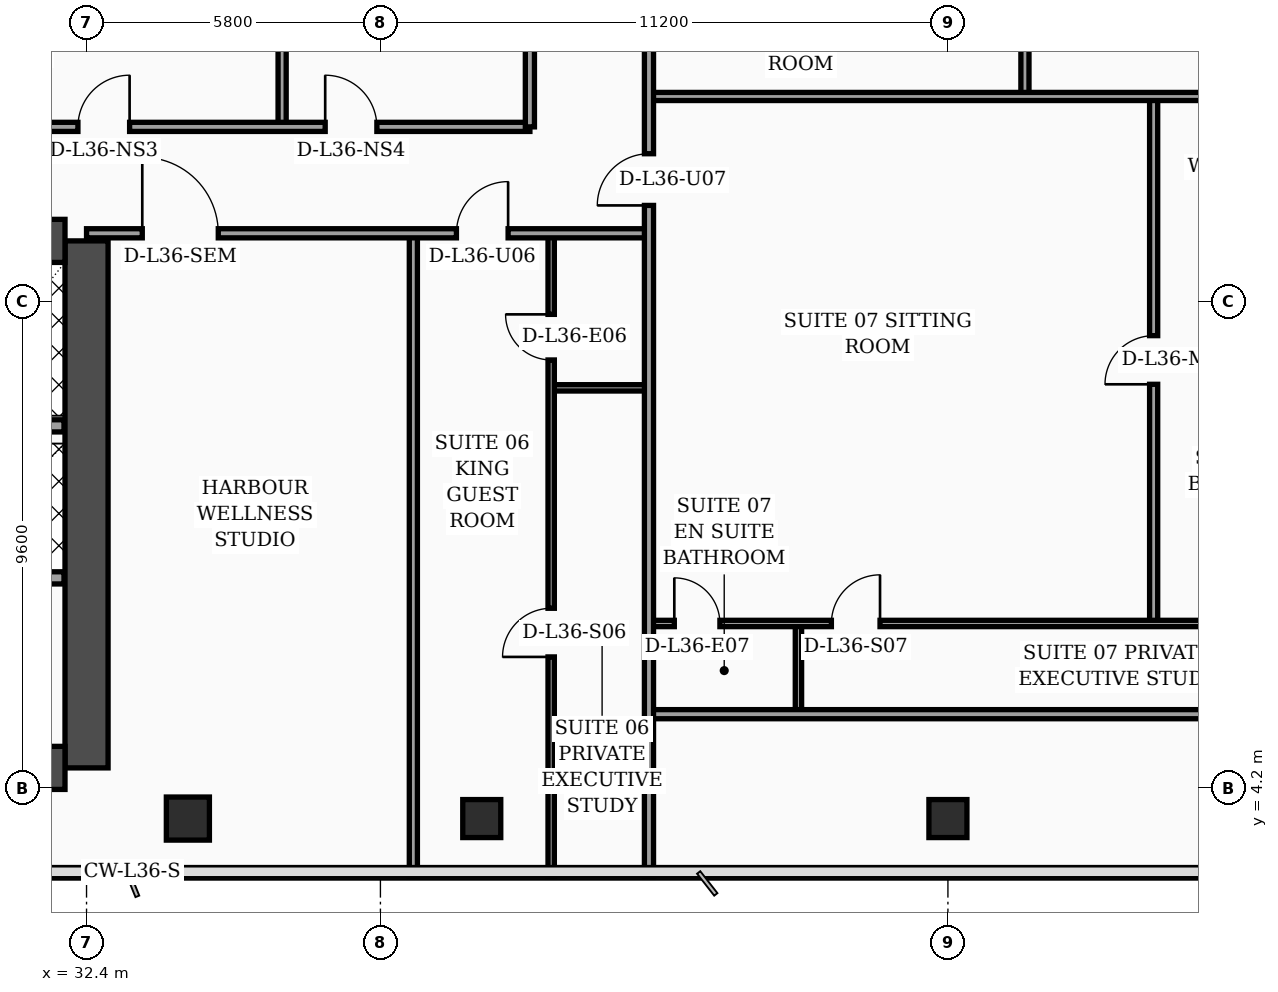
"""IFC4 building model, lengths in metres.
Left out: names, types, materials, properties, quantities, classifications, styles, units other than length and angle.
Written with IfcOpenShell. Run it as: python <this file> out.ifc"""

import sys

from ifc_helpers import new_model, si_unit, direction, frame, frame_2d, origin, origin_2d, place, context, subcontext, project, spatial, rectangle, hollow_rectangle, extrude, element, fill, save


model = new_model("IFC4")
c1 = context("Model", 3, precision=1e-05, world=origin(), true_north=direction((0.0, 1.0)))
c2 = subcontext(c1, "Body", "Model", "MODEL_VIEW")
j1 = project(units=[si_unit("LENGTHUNIT", "METRE"), si_unit("PLANEANGLEUNIT", "RADIAN")], contexts=[c1])
p1 = place(None, origin())
s1 = spatial("IfcSite", under=j1, at=p1, CompositionType="ELEMENT")
p2 = place(p1, origin())
s2 = spatial("IfcBuilding", under=s1, at=p2, CompositionType="ELEMENT")
p3 = place(p2, frame((0.0, 0.0, 148.5)))
s3 = spatial("IfcBuildingStorey", under=s2, at=p3, CompositionType="ELEMENT", Elevation=148.5)
p4 = place(p3, frame((32.4, 4.6, 0.0), z_axis=(0.0, 0.0, 1.0), x_axis=(0.0, 1.0, 0.0)))
e1 = element("IfcWall", 1, at=p4, inside=s3, PredefinedType="SHEAR", context=c2, shape_type="SweptSolid", body=[
    extrude(rectangle(XDim=10.4, YDim=0.85, at=frame_2d((5.2, 0.0))), origin(), (0.0, 0.0, 1.0), 3.56),
])
p5 = place(p3, frame((22.025, 15.0, 0.0), z_axis=(0.0, 0.0, 1.0), x_axis=(1.0, 0.0, 0.0)))
e2 = element("IfcWall", 2, at=p5, inside=s3, PredefinedType="SHEAR", context=c2, shape_type="SweptSolid", body=[
    extrude(rectangle(XDim=9.95, YDim=0.85, at=frame_2d((4.975, 0.0))), origin(), (0.0, 0.0, 1.0), 3.56),
])
p6 = place(p5, frame((4.88, 0.0, 0.0)))
e3 = element("IfcOpeningElement", 3, at=p6, cuts=e2, PredefinedType="OPENING", context=c2, shape_type="SweptSolid", body=[
    extrude(rectangle(XDim=1.1, YDim=2.2, at=frame_2d((0.55, 1.1))), frame((0.0, 0.435, 0.0), z_axis=(0.0, -1.0, 0.0), x_axis=(1.0, 0.0, 0.0)), (0.0, 0.0, 1.0), 0.87),
])
p7 = place(p3, frame((22.025, 4.6, 0.0), z_axis=(0.0, 0.0, 1.0), x_axis=(1.0, 0.0, 0.0)))
e4 = element("IfcWall", 4, at=p7, inside=s3, PredefinedType="SHEAR", context=c2, shape_type="SweptSolid", body=[
    extrude(rectangle(XDim=9.95, YDim=0.85, at=frame_2d((4.975, 0.0))), origin(), (0.0, 0.0, 1.0), 3.56),
])
p8 = place(p3, frame((34.4, 3.6, 0.0), z_axis=(0.0, 0.0, 1.0), x_axis=(1.0, 0.0, 0.0)))
e5 = element("IfcColumn", 5, at=p8, inside=s3, PredefinedType="COLUMN", context=c2, shape_type="SweptSolid", body=[
    extrude(hollow_rectangle(XDim=0.85, YDim=0.85, WallThickness=0.036, at=origin_2d()), origin(), (0.0, 0.0, 1.0), 3.56),
])
for number, where, z_axis, x_axis in (
    (6, (40.2, 3.6, 0.0), (0.0, 0.0, 1.0), (1.0, 0.0, 0.0)),
    (7, (49.4, 3.6, 0.0), (0.0, 0.0, 1.0), (1.0, 0.0, 0.0)),
):
    element("IfcColumn", number, at=place(p3, frame(where, z_axis=z_axis, x_axis=x_axis)), inside=s3, PredefinedType="COLUMN", context=c2, shape_type="SweptSolid", body=[
        extrude(hollow_rectangle(XDim=0.75, YDim=0.75, WallThickness=0.032, at=origin_2d()), origin(), (0.0, 0.0, 1.0), 3.56),
    ])
p9 = place(p3, frame((59.23, 5.505, 0.0), z_axis=(0.0, 0.0, 1.0), x_axis=(-0.300509063924, 0.953778958931, 0.0)))
e8 = element("IfcWall", 8, at=p9, inside=s3, PredefinedType="SOLIDWALL", context=c2, shape_type="SweptSolid", body=[
    extrude(rectangle(XDim=30.814, YDim=0.32, at=frame_2d((15.407, 0.0))), origin(), (0.0, 0.0, 1.0), 3.56),
])
p10 = place(p9, frame((4.747, 0.0, 0.0)))
e9 = element("IfcOpeningElement", 9, at=p10, cuts=e8, PredefinedType="OPENING", context=c2, shape_type="SweptSolid", body=[
    extrude(rectangle(XDim=1.4, YDim=2.25, at=frame_2d((0.7, 1.125))), frame((0.0, 0.17, 0.0), z_axis=(0.0, -1.0, 0.0), x_axis=(1.0, 0.0, 0.0)), (0.0, 0.0, 1.0), 0.34),
])
p11 = place(p9, frame((2.65, 0.0, 0.75)))
e10 = element("IfcOpeningElement", 10, at=p11, cuts=e8, PredefinedType="OPENING", context=c2, shape_type="SweptSolid", body=[
    extrude(rectangle(XDim=1.5, YDim=1.6, at=frame_2d((0.75, 0.8))), frame((0.0, 0.17, 0.0), z_axis=(0.0, -1.0, 0.0), x_axis=(1.0, 0.0, 0.0)), (0.0, 0.0, 1.0), 0.34),
])
p12 = place(p9, frame((7.8, 0.0, 0.75)))
e11 = element("IfcOpeningElement", 11, at=p12, cuts=e8, PredefinedType="OPENING", context=c2, shape_type="SweptSolid", body=[
    extrude(rectangle(XDim=1.5, YDim=1.6, at=frame_2d((0.75, 0.8))), frame((0.0, 0.17, 0.0), z_axis=(0.0, -1.0, 0.0), x_axis=(1.0, 0.0, 0.0)), (0.0, 0.0, 1.0), 0.34),
])
p13 = place(p9, frame((10.9, 0.0, 0.75)))
e12 = element("IfcOpeningElement", 12, at=p13, cuts=e8, PredefinedType="OPENING", context=c2, shape_type="SweptSolid", body=[
    extrude(rectangle(XDim=1.5, YDim=1.6, at=frame_2d((0.75, 0.8))), frame((0.0, 0.17, 0.0), z_axis=(0.0, -1.0, 0.0), x_axis=(1.0, 0.0, 0.0)), (0.0, 0.0, 1.0), 0.34),
])
p14 = place(p9, frame((14.0, 0.0, 0.75)))
e13 = element("IfcOpeningElement", 13, at=p14, cuts=e8, PredefinedType="OPENING", context=c2, shape_type="SweptSolid", body=[
    extrude(rectangle(XDim=1.5, YDim=1.6, at=frame_2d((0.75, 0.8))), frame((0.0, 0.17, 0.0), z_axis=(0.0, -1.0, 0.0), x_axis=(1.0, 0.0, 0.0)), (0.0, 0.0, 1.0), 0.34),
])
p15 = place(p9, frame((17.1, 0.0, 0.75)))
e14 = element("IfcOpeningElement", 14, at=p15, cuts=e8, PredefinedType="OPENING", context=c2, shape_type="SweptSolid", body=[
    extrude(rectangle(XDim=1.5, YDim=1.6, at=frame_2d((0.75, 0.8))), frame((0.0, 0.17, 0.0), z_axis=(0.0, -1.0, 0.0), x_axis=(1.0, 0.0, 0.0)), (0.0, 0.0, 1.0), 0.34),
])
p16 = place(p9, frame((23.3, 0.0, 0.75)))
e15 = element("IfcOpeningElement", 15, at=p16, cuts=e8, PredefinedType="OPENING", context=c2, shape_type="SweptSolid", body=[
    extrude(rectangle(XDim=1.5, YDim=1.6, at=frame_2d((0.75, 0.8))), frame((0.0, 0.17, 0.0), z_axis=(0.0, -1.0, 0.0), x_axis=(1.0, 0.0, 0.0)), (0.0, 0.0, 1.0), 0.34),
])
p17 = place(p9, frame((27.45, 0.0, 0.75)))
e16 = element("IfcOpeningElement", 16, at=p17, cuts=e8, PredefinedType="OPENING", context=c2, shape_type="SweptSolid", body=[
    extrude(rectangle(XDim=1.5, YDim=1.6, at=frame_2d((0.75, 0.8))), frame((0.0, 0.17, 0.0), z_axis=(0.0, -1.0, 0.0), x_axis=(1.0, 0.0, 0.0)), (0.0, 0.0, 1.0), 0.34),
])
p18 = place(p3, frame((27.02, 11.35, 0.0), z_axis=(0.0, 0.0, 1.0), x_axis=(1.0, 0.0, 0.0)))
e17 = element("IfcWall", 17, at=p18, inside=s3, PredefinedType="SOLIDWALL", context=c2, shape_type="SweptSolid", body=[
    extrude(rectangle(XDim=4.935, YDim=0.24, at=frame_2d((2.468, 0.0))), origin(), (0.0, 0.0, 1.0), 3.56),
])
p19 = place(p18, frame((0.45, 0.0, 0.0)))
e18 = element("IfcOpeningElement", 18, at=p19, cuts=e17, PredefinedType="OPENING", context=c2, shape_type="SweptSolid", body=[
    extrude(rectangle(XDim=1.3, YDim=2.35, at=frame_2d((0.65, 1.175))), frame((0.0, 0.13, 0.0), z_axis=(0.0, -1.0, 0.0), x_axis=(1.0, 0.0, 0.0)), (0.0, 0.0, 1.0), 0.26),
])
p20 = place(p3, frame((27.02, 8.35, 0.0), z_axis=(0.0, 0.0, 1.0), x_axis=(1.0, 0.0, 0.0)))
e19 = element("IfcWall", 19, at=p20, inside=s3, PredefinedType="SOLIDWALL", context=c2, shape_type="SweptSolid", body=[
    extrude(rectangle(XDim=4.935, YDim=0.24, at=frame_2d((2.468, 0.0))), origin(), (0.0, 0.0, 1.0), 3.56),
])
p21 = place(p3, frame((41.57, 12.1, 0.0), z_axis=(0.0, 0.0, 1.0), x_axis=(1.0, 0.0, 0.0)))
e20 = element("IfcWall", 20, at=p21, inside=s3, PredefinedType="PARTITIONING", context=c2, shape_type="SweptSolid", body=[
    extrude(rectangle(XDim=1.93, YDim=0.125, at=frame_2d((0.965, 0.0))), origin(), (0.0, 0.0, 1.0), 3.56),
])
p22 = place(p3, frame((41.57, 2.44, 0.0), z_axis=(0.0, 0.0, 1.0), x_axis=(0.0, 1.0, 0.0)))
e21 = element("IfcWall", 21, at=p22, inside=s3, PredefinedType="PARTITIONING", context=c2, shape_type="SweptSolid", body=[
    extrude(rectangle(XDim=12.71, YDim=0.125, at=frame_2d((6.355, 0.0))), origin(), (0.0, 0.0, 1.0), 3.04),
])
p23 = place(p22, frame((4.35, 0.0, 0.0)))
e22 = element("IfcOpeningElement", 22, at=p23, cuts=e21, PredefinedType="OPENING", context=c2, shape_type="SweptSolid", body=[
    extrude(rectangle(XDim=0.96, YDim=2.2, at=frame_2d((0.48, 1.1))), frame((0.0, 0.073, 0.0), z_axis=(0.0, -1.0, 0.0), x_axis=(1.0, 0.0, 0.0)), (0.0, 0.0, 1.0), 0.145),
])
p24 = place(p22, frame((10.21, 0.0, 0.0)))
e23 = element("IfcOpeningElement", 23, at=p24, cuts=e21, PredefinedType="OPENING", context=c2, shape_type="SweptSolid", body=[
    extrude(rectangle(XDim=0.9, YDim=2.15, at=frame_2d((0.45, 1.075))), frame((0.0, 0.073, 0.0), z_axis=(0.0, -1.0, 0.0), x_axis=(1.0, 0.0, 0.0)), (0.0, 0.0, 1.0), 0.145),
])
p25 = place(p3, frame((38.85, 2.44, 0.0), z_axis=(0.0, 0.0, 1.0), x_axis=(0.0, 1.0, 0.0)))
e24 = element("IfcWall", 24, at=p25, inside=s3, PredefinedType="PARTITIONING", context=c2, shape_type="SweptSolid", body=[
    extrude(rectangle(XDim=12.71, YDim=0.16, at=frame_2d((6.355, 0.0))), origin(), (0.0, 0.0, 1.0), 2.94),
])
p26 = place(p3, frame((32.4, 15.15, 0.0), z_axis=(0.0, 0.0, 1.0), x_axis=(1.0, 0.0, 0.0)))
e25 = element("IfcWall", 25, at=p26, inside=s3, PredefinedType="PARTITIONING", context=c2, shape_type="SweptSolid", body=[
    extrude(rectangle(XDim=11.1, YDim=0.18, at=frame_2d((5.55, 0.0))), origin(), (0.0, 0.0, 1.0), 2.94),
])
p27 = place(p26, frame((1.1, 0.0, 0.0)))
e26 = element("IfcOpeningElement", 26, at=p27, cuts=e25, PredefinedType="OPENING", context=c2, shape_type="SweptSolid", body=[
    extrude(rectangle(XDim=1.5, YDim=2.22, at=frame_2d((0.75, 1.11))), frame((0.0, 0.1, 0.0), z_axis=(0.0, -1.0, 0.0), x_axis=(1.0, 0.0, 0.0)), (0.0, 0.0, 1.0), 0.2),
])
p28 = place(p26, frame((7.3, 0.0, 0.0)))
e27 = element("IfcOpeningElement", 27, at=p28, cuts=e25, PredefinedType="OPENING", context=c2, shape_type="SweptSolid", body=[
    extrude(rectangle(XDim=1.02, YDim=2.2, at=frame_2d((0.51, 1.1))), frame((0.0, 0.1, 0.0), z_axis=(0.0, -1.0, 0.0), x_axis=(1.0, 0.0, 0.0)), (0.0, 0.0, 1.0), 0.2),
])
p29 = place(p3, frame((36.26, 17.25, 0.0), z_axis=(0.0, 0.0, 1.0), x_axis=(0.0, 1.0, 0.0)))
e28 = element("IfcWall", 28, at=p29, inside=s3, PredefinedType="PARTITIONING", context=c2, shape_type="SweptSolid", body=[
    extrude(rectangle(XDim=15.4, YDim=0.16, at=frame_2d((7.7, 0.0))), origin(), (0.0, 0.0, 1.0), 2.94),
])
p30 = place(p3, frame((21.5, 17.25, 0.0), z_axis=(0.0, 0.0, 1.0), x_axis=(1.0, 0.0, 0.0)))
e29 = element("IfcWall", 29, at=p30, inside=s3, PredefinedType="PARTITIONING", context=c2, shape_type="SweptSolid", body=[
    extrude(rectangle(XDim=19.65, YDim=0.18, at=frame_2d((9.825, 0.0))), origin(), (0.0, 0.0, 1.0), 2.94),
])
p31 = place(p30, frame((0.95, 0.0, 0.0)))
e30 = element("IfcOpeningElement", 30, at=p31, cuts=e29, PredefinedType="OPENING", context=c2, shape_type="SweptSolid", body=[
    extrude(rectangle(XDim=1.02, YDim=2.2, at=frame_2d((0.51, 1.1))), frame((0.0, 0.1, 0.0), z_axis=(0.0, -1.0, 0.0), x_axis=(1.0, 0.0, 0.0)), (0.0, 0.0, 1.0), 0.2),
])
p32 = place(p30, frame((6.49, 0.0, 0.0)))
e31 = element("IfcOpeningElement", 31, at=p32, cuts=e29, PredefinedType="OPENING", context=c2, shape_type="SweptSolid", body=[
    extrude(rectangle(XDim=1.02, YDim=2.2, at=frame_2d((0.51, 1.1))), frame((0.0, 0.1, 0.0), z_axis=(0.0, -1.0, 0.0), x_axis=(1.0, 0.0, 0.0)), (0.0, 0.0, 1.0), 0.2),
])
p33 = place(p30, frame((10.73, 0.0, 0.0)))
e32 = element("IfcOpeningElement", 32, at=p33, cuts=e29, PredefinedType="OPENING", context=c2, shape_type="SweptSolid", body=[
    extrude(rectangle(XDim=1.02, YDim=2.2, at=frame_2d((0.51, 1.1))), frame((0.0, 0.1, 0.0), z_axis=(0.0, -1.0, 0.0), x_axis=(1.0, 0.0, 0.0)), (0.0, 0.0, 1.0), 0.2),
])
p34 = place(p30, frame((15.61, 0.0, 0.0)))
e33 = element("IfcOpeningElement", 33, at=p34, cuts=e29, PredefinedType="OPENING", context=c2, shape_type="SweptSolid", body=[
    extrude(rectangle(XDim=1.02, YDim=2.2, at=frame_2d((0.51, 1.1))), frame((0.0, 0.1, 0.0), z_axis=(0.0, -1.0, 0.0), x_axis=(1.0, 0.0, 0.0)), (0.0, 0.0, 1.0), 0.2),
])
p35 = place(p3, frame((41.15, 17.25, 0.0), z_axis=(0.0, 0.0, 1.0), x_axis=(0.0, 1.0, 0.0)))
e34 = element("IfcWall", 34, at=p35, inside=s3, PredefinedType="PARTITIONING", context=c2, shape_type="SweptSolid", body=[
    extrude(rectangle(XDim=18.13, YDim=0.18, at=frame_2d((9.065, 0.0))), origin(), (0.0, 0.0, 1.0), 2.94),
])
p36 = place(p3, frame((46.45, 5.66, 0.0), z_axis=(0.0, 0.0, 1.0), x_axis=(0.0, 1.0, 0.0)))
e35 = element("IfcWall", 35, at=p36, inside=s3, PredefinedType="PARTITIONING", context=c2, shape_type="SweptSolid", body=[
    extrude(rectangle(XDim=1.79, YDim=0.125, at=frame_2d((0.895, 0.0))), origin(), (0.0, 0.0, 1.0), 3.56),
])
p37 = place(p3, frame((53.46, 7.45, 0.0), z_axis=(0.0, 0.0, 1.0), x_axis=(0.0, 1.0, 0.0)))
e36 = element("IfcWall", 36, at=p37, inside=s3, PredefinedType="PARTITIONING", context=c2, shape_type="SweptSolid", body=[
    extrude(rectangle(XDim=10.4, YDim=0.16, at=frame_2d((5.2, 0.0))), origin(), (0.0, 0.0, 1.0), 3.04),
])
p38 = place(p37, frame((4.72, 0.0, 0.0)))
e37 = element("IfcOpeningElement", 37, at=p38, cuts=e36, PredefinedType="OPENING", context=c2, shape_type="SweptSolid", body=[
    extrude(rectangle(XDim=0.96, YDim=2.2, at=frame_2d((0.48, 1.1))), frame((0.0, 0.09, 0.0), z_axis=(0.0, -1.0, 0.0), x_axis=(1.0, 0.0, 0.0)), (0.0, 0.0, 1.0), 0.18),
])
p39 = place(p3, frame((43.5, 7.45, 0.0), z_axis=(0.0, 0.0, 1.0), x_axis=(1.0, 0.0, 0.0)))
e38 = element("IfcWall", 38, at=p39, inside=s3, PredefinedType="PARTITIONING", context=c2, shape_type="SweptSolid", body=[
    extrude(rectangle(XDim=15.06, YDim=0.125, at=frame_2d((7.53, 0.0))), origin(), (0.0, 0.0, 1.0), 2.94),
])
p40 = place(p39, frame((0.5, 0.0, 0.0)))
e39 = element("IfcOpeningElement", 39, at=p40, cuts=e38, PredefinedType="OPENING", context=c2, shape_type="SweptSolid", body=[
    extrude(rectangle(XDim=0.9, YDim=2.15, at=frame_2d((0.45, 1.075))), frame((0.0, 0.073, 0.0), z_axis=(0.0, -1.0, 0.0), x_axis=(1.0, 0.0, 0.0)), (0.0, 0.0, 1.0), 0.145),
])
p41 = place(p39, frame((3.6, 0.0, 0.0)))
e40 = element("IfcOpeningElement", 40, at=p41, cuts=e38, PredefinedType="OPENING", context=c2, shape_type="SweptSolid", body=[
    extrude(rectangle(XDim=0.96, YDim=2.2, at=frame_2d((0.48, 1.1))), frame((0.0, 0.073, 0.0), z_axis=(0.0, -1.0, 0.0), x_axis=(1.0, 0.0, 0.0)), (0.0, 0.0, 1.0), 0.145),
])
p42 = place(p3, frame((43.5, 5.66, 0.0), z_axis=(0.0, 0.0, 1.0), x_axis=(1.0, 0.0, 0.0)))
e41 = element("IfcWall", 41, at=p42, inside=s3, PredefinedType="PARTITIONING", context=c2, shape_type="SweptSolid", body=[
    extrude(rectangle(XDim=12.5, YDim=0.18, at=frame_2d((6.25, 0.0))), origin(), (0.0, 0.0, 1.0), 2.94),
])
p43 = place(p3, frame((50.92, 17.85, 0.0), z_axis=(0.0, 0.0, 1.0), x_axis=(0.0, 1.0, 0.0)))
e42 = element("IfcWall", 42, at=p43, inside=s3, PredefinedType="PARTITIONING", context=c2, shape_type="SweptSolid", body=[
    extrude(rectangle(XDim=5.74, YDim=0.16, at=frame_2d((2.87, 0.0))), origin(), (0.0, 0.0, 1.0), 2.94),
])
p44 = place(p43, frame((2.39, 0.0, 0.0)))
e43 = element("IfcOpeningElement", 43, at=p44, cuts=e42, PredefinedType="OPENING", context=c2, shape_type="SweptSolid", body=[
    extrude(rectangle(XDim=0.96, YDim=2.2, at=frame_2d((0.48, 1.1))), frame((0.0, 0.09, 0.0), z_axis=(0.0, -1.0, 0.0), x_axis=(1.0, 0.0, 0.0)), (0.0, 0.0, 1.0), 0.18),
])
p45 = place(p3, frame((43.5, 17.85, 0.0), z_axis=(0.0, 0.0, 1.0), x_axis=(1.0, 0.0, 0.0)))
e44 = element("IfcWall", 44, at=p45, inside=s3, PredefinedType="PARTITIONING", context=c2, shape_type="SweptSolid", body=[
    extrude(rectangle(XDim=11.78, YDim=0.16, at=frame_2d((5.89, 0.0))), origin(), (0.0, 0.0, 1.0), 2.94),
])
p46 = place(p3, frame((43.5, 2.44, 0.0), z_axis=(0.0, 0.0, 1.0), x_axis=(0.0, 1.0, 0.0)))
e45 = element("IfcWall", 45, at=p46, inside=s3, PredefinedType="PARTITIONING", context=c2, shape_type="SweptSolid", body=[
    extrude(rectangle(XDim=31.04, YDim=0.18, at=frame_2d((15.52, 0.0))), origin(), (0.0, 0.0, 1.0), 2.94),
])
p47 = place(p46, frame((13.26, 0.0, 0.0)))
e46 = element("IfcOpeningElement", 46, at=p47, cuts=e45, PredefinedType="OPENING", context=c2, shape_type="SweptSolid", body=[
    extrude(rectangle(XDim=1.02, YDim=2.2, at=frame_2d((0.51, 1.1))), frame((0.0, 0.1, 0.0), z_axis=(0.0, -1.0, 0.0), x_axis=(1.0, 0.0, 0.0)), (0.0, 0.0, 1.0), 0.2),
])
p48 = place(p46, frame((17.77, 0.0, 0.0)))
e47 = element("IfcOpeningElement", 47, at=p48, cuts=e45, PredefinedType="OPENING", context=c2, shape_type="SweptSolid", body=[
    extrude(rectangle(XDim=1.02, YDim=2.2, at=frame_2d((0.51, 1.1))), frame((0.0, 0.1, 0.0), z_axis=(0.0, -1.0, 0.0), x_axis=(1.0, 0.0, 0.0)), (0.0, 0.0, 1.0), 0.2),
])
p49 = place(p46, frame((25.58, 0.0, 0.0)))
e48 = element("IfcOpeningElement", 48, at=p49, cuts=e45, PredefinedType="OPENING", context=c2, shape_type="SweptSolid", body=[
    extrude(rectangle(XDim=1.02, YDim=2.2, at=frame_2d((0.51, 1.1))), frame((0.0, 0.1, 0.0), z_axis=(0.0, -1.0, 0.0), x_axis=(1.0, 0.0, 0.0)), (0.0, 0.0, 1.0), 0.2),
])
p50 = place(p23, origin())
e49 = element("IfcDoor", 49, at=p50, inside=s3, OperationType="SINGLE_SWING_LEFT", PredefinedType="DOOR", context=c2, shape_type="SweptSolid", body=[
    extrude(rectangle(XDim=0.96, YDim=2.2, at=frame_2d((0.48, 1.1))), frame((0.0, 0.025, 0.0), z_axis=(0.0, -1.0, 0.0), x_axis=(1.0, 0.0, 0.0)), (0.0, 0.0, 1.0), 0.05),
])
fill(e22, e49)
p51 = place(p24, origin())
e50 = element("IfcDoor", 50, at=p51, inside=s3, OperationType="SINGLE_SWING_RIGHT", PredefinedType="DOOR", context=c2, shape_type="SweptSolid", body=[
    extrude(rectangle(XDim=0.9, YDim=2.15, at=frame_2d((0.45, 1.075))), frame((0.0, 0.025, 0.0), z_axis=(0.0, -1.0, 0.0), x_axis=(1.0, 0.0, 0.0)), (0.0, 0.0, 1.0), 0.05),
])
fill(e23, e50)
p52 = place(p27, origin())
e51 = element("IfcDoor", 51, at=p52, inside=s3, OperationType="SINGLE_SWING_LEFT", PredefinedType="DOOR", context=c2, shape_type="SweptSolid", body=[
    extrude(rectangle(XDim=1.5, YDim=2.22, at=frame_2d((0.75, 1.11))), frame((0.0, 0.025, 0.0), z_axis=(0.0, -1.0, 0.0), x_axis=(1.0, 0.0, 0.0)), (0.0, 0.0, 1.0), 0.05),
])
fill(e26, e51)
p53 = place(p28, origin())
e52 = element("IfcDoor", 52, at=p53, inside=s3, OperationType="SINGLE_SWING_RIGHT", PredefinedType="DOOR", context=c2, shape_type="SweptSolid", body=[
    extrude(rectangle(XDim=1.02, YDim=2.2, at=frame_2d((0.51, 1.1))), frame((0.0, 0.025, 0.0), z_axis=(0.0, -1.0, 0.0), x_axis=(1.0, 0.0, 0.0)), (0.0, 0.0, 1.0), 0.05),
])
fill(e27, e52)
p54 = place(p33, origin())
e53 = element("IfcDoor", 53, at=p54, inside=s3, OperationType="SINGLE_SWING_RIGHT", PredefinedType="DOOR", context=c2, shape_type="SweptSolid", body=[
    extrude(rectangle(XDim=1.02, YDim=2.2, at=frame_2d((0.51, 1.1))), frame((0.0, 0.025, 0.0), z_axis=(0.0, -1.0, 0.0), x_axis=(1.0, 0.0, 0.0)), (0.0, 0.0, 1.0), 0.05),
])
fill(e32, e53)
p55 = place(p34, origin())
e54 = element("IfcDoor", 54, at=p55, inside=s3, OperationType="SINGLE_SWING_LEFT", PredefinedType="DOOR", context=c2, shape_type="SweptSolid", body=[
    extrude(rectangle(XDim=1.02, YDim=2.2, at=frame_2d((0.51, 1.1))), frame((0.0, 0.025, 0.0), z_axis=(0.0, -1.0, 0.0), x_axis=(1.0, 0.0, 0.0)), (0.0, 0.0, 1.0), 0.05),
])
fill(e33, e54)
p56 = place(p38, origin())
e55 = element("IfcDoor", 55, at=p56, inside=s3, OperationType="SINGLE_SWING_LEFT", PredefinedType="DOOR", context=c2, shape_type="SweptSolid", body=[
    extrude(rectangle(XDim=0.96, YDim=2.2, at=frame_2d((0.48, 1.1))), frame((0.0, 0.025, 0.0), z_axis=(0.0, -1.0, 0.0), x_axis=(1.0, 0.0, 0.0)), (0.0, 0.0, 1.0), 0.05),
])
fill(e37, e55)
p57 = place(p40, origin())
e56 = element("IfcDoor", 56, at=p57, inside=s3, OperationType="SINGLE_SWING_LEFT", PredefinedType="DOOR", context=c2, shape_type="SweptSolid", body=[
    extrude(rectangle(XDim=0.9, YDim=2.15, at=frame_2d((0.45, 1.075))), frame((0.0, 0.025, 0.0), z_axis=(0.0, -1.0, 0.0), x_axis=(1.0, 0.0, 0.0)), (0.0, 0.0, 1.0), 0.05),
])
fill(e39, e56)
p58 = place(p41, origin())
e57 = element("IfcDoor", 57, at=p58, inside=s3, OperationType="SINGLE_SWING_RIGHT", PredefinedType="DOOR", context=c2, shape_type="SweptSolid", body=[
    extrude(rectangle(XDim=0.96, YDim=2.2, at=frame_2d((0.48, 1.1))), frame((0.0, 0.025, 0.0), z_axis=(0.0, -1.0, 0.0), x_axis=(1.0, 0.0, 0.0)), (0.0, 0.0, 1.0), 0.05),
])
fill(e40, e57)
p59 = place(p47, origin())
e58 = element("IfcDoor", 58, at=p59, inside=s3, OperationType="SINGLE_SWING_LEFT", PredefinedType="DOOR", context=c2, shape_type="SweptSolid", body=[
    extrude(rectangle(XDim=1.02, YDim=2.2, at=frame_2d((0.51, 1.1))), frame((0.0, 0.025, 0.0), z_axis=(0.0, -1.0, 0.0), x_axis=(1.0, 0.0, 0.0)), (0.0, 0.0, 1.0), 0.05),
])
fill(e46, e58)
save(model, sys.argv[1])
